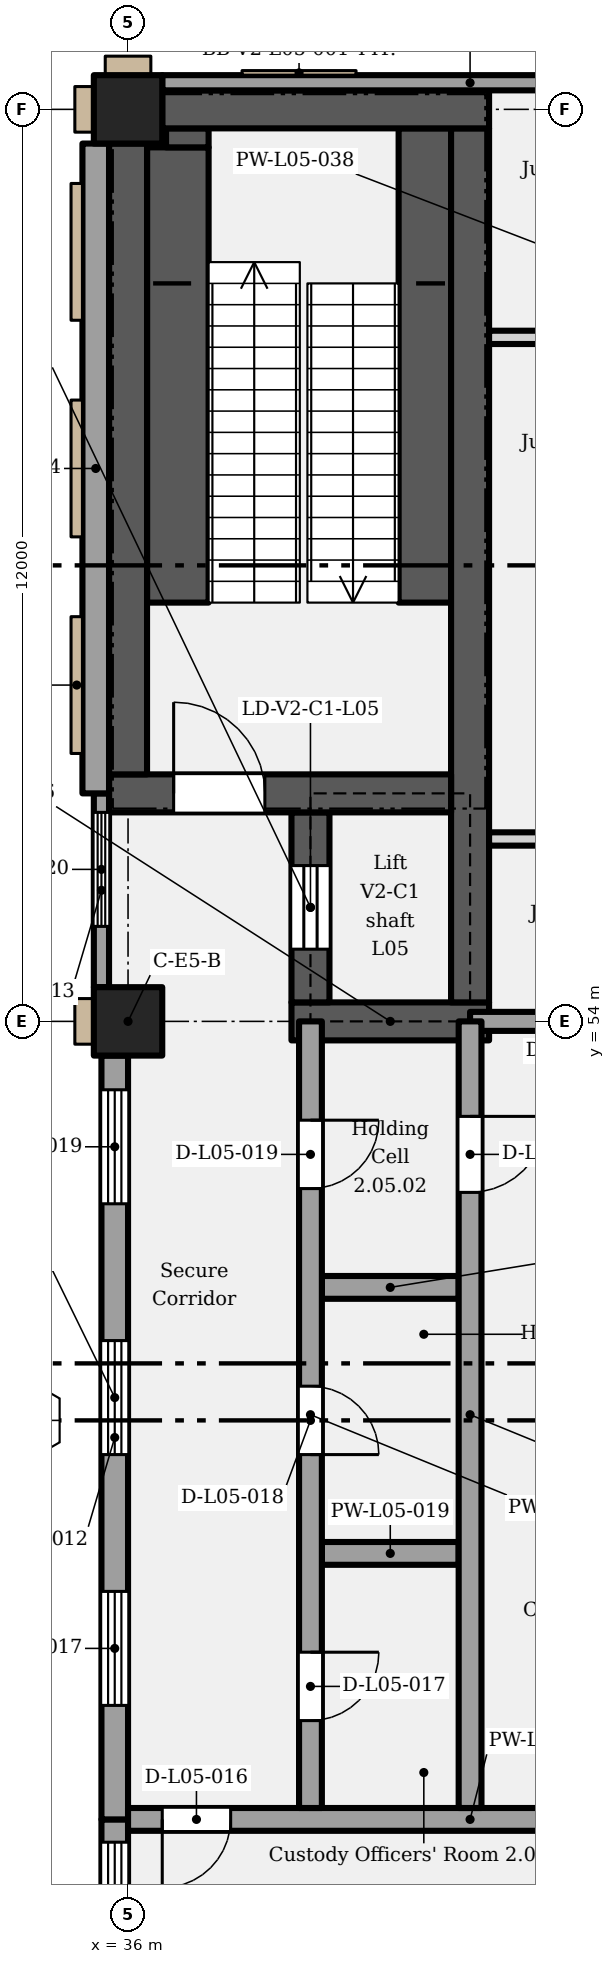
"""IFC4 building model, lengths in metres.
Left out: names, types, materials, properties, quantities, classifications, styles, units other than length and angle.
Written with IfcOpenShell. Run it as: python <this file> out.ifc"""

import sys

from ifc_helpers import new_model, si_unit, direction, frame, frame_2d, origin, origin_2d, place, context, subcontext, project, spatial, rectangle, extrude, element, fill, save


model = new_model("IFC4")
c1 = context("Model", 3, precision=1e-05, world=origin(), true_north=direction((0.0, 1.0)))
c2 = subcontext(c1, "Body", "Model", "MODEL_VIEW")
j1 = project(units=[si_unit("LENGTHUNIT", "METRE"), si_unit("PLANEANGLEUNIT", "RADIAN")], contexts=[c1])
p1 = place(None, origin())
s1 = spatial("IfcSite", under=j1, at=p1, CompositionType="ELEMENT")
p2 = place(p1, origin())
s2 = spatial("IfcBuilding", under=s1, at=p2, CompositionType="ELEMENT")
p3 = place(p2, frame((0.0, 0.0, 28.2)))
s3 = spatial("IfcBuildingStorey", under=s2, at=p3, CompositionType="ELEMENT", Elevation=28.2)
for number, where, z_axis, x_axis in (
    (1, (36.0, 54.0, 0.0), (0.0, 0.0, 1.0), (1.0, 0.0, 0.0)),
    (2, (36.0, 66.0, 0.0), (0.0, 0.0, 1.0), (1.0, 0.0, 0.0)),
):
    element("IfcColumn", number, at=place(p3, frame(where, z_axis=z_axis, x_axis=x_axis)), inside=s3, PredefinedType="COLUMN", context=c2, shape_type="SweptSolid", body=[
        extrude(rectangle(XDim=0.9, YDim=0.9, at=origin_2d()), origin(), (0.0, 0.0, 1.0), 5.4),
    ])
p4 = place(p3, frame((38.15, 54.0, 0.0), z_axis=(0.0, 0.0, 1.0), x_axis=(1.0, 0.0, 0.0)))
e3 = element("IfcWall", 3, at=p4, inside=s3, PredefinedType="SHEAR", context=c2, shape_type="SweptSolid", body=[
    extrude(rectangle(XDim=2.6, YDim=0.5, at=frame_2d((1.3, 0.0))), origin(), (0.0, 0.0, 1.0), 5.15),
])
p5 = place(p3, frame((38.4, 54.25, 0.0), z_axis=(0.0, 0.0, 1.0), x_axis=(0.0, 1.0, 0.0)))
e4 = element("IfcWall", 4, at=p5, inside=s3, PredefinedType="SHEAR", context=c2, shape_type="SweptSolid", body=[
    extrude(rectangle(XDim=2.5, YDim=0.5, at=frame_2d((1.25, 0.0))), origin(), (0.0, 0.0, 1.0), 5.15),
])
p6 = place(p5, frame((0.7, 0.0, 0.0)))
e5 = element("IfcOpeningElement", 5, at=p6, cuts=e4, PredefinedType="OPENING", context=c2, shape_type="SweptSolid", body=[
    extrude(rectangle(XDim=1.1, YDim=2.1, at=frame_2d((0.55, 1.05))), frame((0.0, 0.26, 0.0), z_axis=(0.0, -1.0, 0.0), x_axis=(1.0, 0.0, 0.0)), (0.0, 0.0, 1.0), 0.52),
])
p7 = place(p3, frame((40.5, 54.25, 0.0), z_axis=(0.0, 0.0, 1.0), x_axis=(0.0, 1.0, 0.0)))
e6 = element("IfcWall", 6, at=p7, inside=s3, PredefinedType="SHEAR", context=c2, shape_type="SweptSolid", body=[
    extrude(rectangle(XDim=11.5, YDim=0.5, at=frame_2d((5.75, 0.0))), origin(), (0.0, 0.0, 1.0), 5.15),
])
p8 = place(p3, frame((35.75, 57.0, 0.0), z_axis=(0.0, 0.0, 1.0), x_axis=(1.0, 0.0, 0.0)))
e7 = element("IfcWall", 7, at=p8, inside=s3, PredefinedType="SHEAR", context=c2, shape_type="SweptSolid", body=[
    extrude(rectangle(XDim=4.5, YDim=0.5, at=frame_2d((2.25, 0.0))), origin(), (0.0, 0.0, 1.0), 5.15),
])
p9 = place(p8, frame((0.85, 0.0, 0.0)))
e8 = element("IfcOpeningElement", 8, at=p9, cuts=e7, PredefinedType="OPENING", context=c2, shape_type="SweptSolid", body=[
    extrude(rectangle(XDim=1.2, YDim=2.1, at=frame_2d((0.6, 1.05))), frame((0.0, 0.26, 0.0), z_axis=(0.0, -1.0, 0.0), x_axis=(1.0, 0.0, 0.0)), (0.0, 0.0, 1.0), 0.52),
])
p10 = place(p3, frame((36.0, 57.25, 0.0), z_axis=(0.0, 0.0, 1.0), x_axis=(0.0, 1.0, 0.0)))
e9 = element("IfcWall", 9, at=p10, inside=s3, PredefinedType="SHEAR", context=c2, shape_type="SweptSolid", body=[
    extrude(rectangle(XDim=8.3, YDim=0.5, at=frame_2d((4.15, 0.0))), origin(), (0.0, 0.0, 1.0), 5.15),
])
p11 = place(p3, frame((36.45, 66.0, 0.0), z_axis=(0.0, 0.0, 1.0), x_axis=(1.0, 0.0, 0.0)))
e10 = element("IfcWall", 10, at=p11, inside=s3, PredefinedType="SHEAR", context=c2, shape_type="SweptSolid", body=[
    extrude(rectangle(XDim=4.3, YDim=0.5, at=frame_2d((2.15, 0.0))), origin(), (0.0, 0.0, 1.0), 5.15),
])
p12 = place(p3, frame((36.45, 66.35, 0.0), z_axis=(0.0, 0.0, 1.0), x_axis=(1.0, 0.0, 0.0)))
e11 = element("IfcWall", 11, at=p12, inside=s3, PredefinedType="SOLIDWALL", context=c2, shape_type="SweptSolid", body=[
    extrude(rectangle(XDim=8.1, YDim=0.2, at=frame_2d((4.05, 0.0))), origin(), (0.0, 0.0, 1.0), 5.15),
])
p13 = place(p12, frame((6.525, 0.0, 1.05)))
e12 = element("IfcOpeningElement", 12, at=p13, cuts=e11, PredefinedType="OPENING", context=c2, shape_type="SweptSolid", body=[
    extrude(rectangle(XDim=1.05, YDim=2.4, at=frame_2d((0.525, 1.2))), frame((0.0, 0.11, 0.0), z_axis=(0.0, -1.0, 0.0), x_axis=(1.0, 0.0, 0.0)), (0.0, 0.0, 1.0), 0.22),
])
p14 = place(p3, frame((35.825, 37.95, 0.0), z_axis=(0.0, 0.0, 1.0), x_axis=(0.0, 1.0, 0.0)))
e13 = element("IfcWall", 13, at=p14, inside=s3, PredefinedType="SOLIDWALL", context=c2, shape_type="SweptSolid", body=[
    extrude(rectangle(XDim=5.55, YDim=0.35, at=frame_2d((2.775, 0.0))), origin(), (0.0, 0.0, 1.0), 5.15),
])
p15 = place(p14, frame((0.45, 0.0, 1.05)))
e14 = element("IfcOpeningElement", 14, at=p15, cuts=e13, PredefinedType="OPENING", context=c2, shape_type="SweptSolid", body=[
    extrude(rectangle(XDim=1.5, YDim=3.5, at=frame_2d((0.75, 1.75))), frame((0.0, 0.185, 0.0), z_axis=(0.0, -1.0, 0.0), x_axis=(1.0, 0.0, 0.0)), (0.0, 0.0, 1.0), 0.37),
])
p16 = place(p14, frame((3.75, 0.0, 1.05)))
e15 = element("IfcOpeningElement", 15, at=p16, cuts=e13, PredefinedType="OPENING", context=c2, shape_type="SweptSolid", body=[
    extrude(rectangle(XDim=1.5, YDim=3.5, at=frame_2d((0.75, 1.75))), frame((0.0, 0.185, 0.0), z_axis=(0.0, -1.0, 0.0), x_axis=(1.0, 0.0, 0.0)), (0.0, 0.0, 1.0), 0.37),
])
p17 = place(p3, frame((35.825, 43.5, 0.0), z_axis=(0.0, 0.0, 1.0), x_axis=(0.0, 1.0, 0.0)))
e16 = element("IfcWall", 16, at=p17, inside=s3, PredefinedType="SOLIDWALL", context=c2, shape_type="SweptSolid", body=[
    extrude(rectangle(XDim=10.05, YDim=0.35, at=frame_2d((5.025, 0.0))), origin(), (0.0, 0.0, 1.0), 5.15),
])
p18 = place(p17, frame((1.5, 0.0, 1.05)))
e17 = element("IfcOpeningElement", 17, at=p18, cuts=e16, PredefinedType="OPENING", context=c2, shape_type="SweptSolid", body=[
    extrude(rectangle(XDim=1.5, YDim=3.5, at=frame_2d((0.75, 1.75))), frame((0.0, 0.185, 0.0), z_axis=(0.0, -1.0, 0.0), x_axis=(1.0, 0.0, 0.0)), (0.0, 0.0, 1.0), 0.37),
])
p19 = place(p17, frame((4.8, 0.0, 1.05)))
e18 = element("IfcOpeningElement", 18, at=p19, cuts=e16, PredefinedType="OPENING", context=c2, shape_type="SweptSolid", body=[
    extrude(rectangle(XDim=1.5, YDim=3.5, at=frame_2d((0.75, 1.75))), frame((0.0, 0.185, 0.0), z_axis=(0.0, -1.0, 0.0), x_axis=(1.0, 0.0, 0.0)), (0.0, 0.0, 1.0), 0.37),
])
p20 = place(p17, frame((8.1, 0.0, 1.05)))
e19 = element("IfcOpeningElement", 19, at=p20, cuts=e16, PredefinedType="OPENING", context=c2, shape_type="SweptSolid", body=[
    extrude(rectangle(XDim=1.5, YDim=3.5, at=frame_2d((0.75, 1.75))), frame((0.0, 0.185, 0.0), z_axis=(0.0, -1.0, 0.0), x_axis=(1.0, 0.0, 0.0)), (0.0, 0.0, 1.0), 0.37),
])
p21 = place(p3, frame((35.65, 54.45, 0.0), z_axis=(0.0, 0.0, 1.0), x_axis=(0.0, 1.0, 0.0)))
e20 = element("IfcWall", 20, at=p21, inside=s3, PredefinedType="SOLIDWALL", context=c2, shape_type="SweptSolid", body=[
    extrude(rectangle(XDim=2.55, YDim=0.2, at=frame_2d((1.275, 0.0))), origin(), (0.0, 0.0, 1.0), 5.15),
])
p22 = place(p21, frame((0.8, 0.0, 1.05)))
e21 = element("IfcOpeningElement", 21, at=p22, cuts=e20, PredefinedType="OPENING", context=c2, shape_type="SweptSolid", body=[
    extrude(rectangle(XDim=1.5, YDim=3.5, at=frame_2d((0.75, 1.75))), frame((0.0, 0.11, 0.0), z_axis=(0.0, -1.0, 0.0), x_axis=(1.0, 0.0, 0.0)), (0.0, 0.0, 1.0), 0.22),
])
p23 = place(p3, frame((35.575, 57.0, 0.0), z_axis=(0.0, 0.0, 1.0), x_axis=(0.0, 1.0, 0.0)))
e22 = element("IfcWall", 22, at=p23, inside=s3, PredefinedType="SOLIDWALL", context=c2, shape_type="SweptSolid", body=[
    extrude(rectangle(XDim=8.55, YDim=0.35, at=frame_2d((4.275, 0.0))), origin(), (0.0, 0.0, 1.0), 5.15),
])
p24 = place(p3, frame((36.0, 43.5, 0.0), z_axis=(0.0, 0.0, 1.0), x_axis=(1.0, 0.0, 0.0)))
e23 = element("IfcWall", 23, at=p24, inside=s3, PredefinedType="PARTITIONING", context=c2, shape_type="SweptSolid", body=[
    extrude(rectangle(XDim=9.0, YDim=0.3, at=frame_2d((4.5, 0.0))), origin(), (0.0, 0.0, 1.0), 5.15),
])
p25 = place(p24, frame((1.35, 0.0, 0.0), z_axis=(0.0, 0.0, 1.0), x_axis=(-1.0, 0.0, 0.0)))
e24 = element("IfcOpeningElement", 24, at=p25, cuts=e23, PredefinedType="OPENING", context=c2, shape_type="SweptSolid", body=[
    extrude(rectangle(XDim=0.9, YDim=2.1, at=frame_2d((0.45, 1.05))), frame((0.0, 0.16, 0.0), z_axis=(0.0, -1.0, 0.0), x_axis=(1.0, 0.0, 0.0)), (0.0, 0.0, 1.0), 0.32),
])
for number, where, z_axis, x_axis in (
    (25, (38.55, 47.0, 0.0), (0.0, 0.0, 1.0), (1.0, 0.0, 0.0)),
    (26, (38.55, 50.5, 0.0), (0.0, 0.0, 1.0), (1.0, 0.0, 0.0)),
):
    element("IfcWall", number, at=place(p3, frame(where, z_axis=z_axis, x_axis=x_axis)), inside=s3, PredefinedType="PARTITIONING", context=c2, shape_type="SweptSolid", body=[
        extrude(rectangle(XDim=1.8, YDim=0.3, at=frame_2d((0.9, 0.0))), origin(), (0.0, 0.0, 1.0), 5.15),
    ])
p26 = place(p3, frame((40.5, 54.0, 0.0), z_axis=(0.0, 0.0, 1.0), x_axis=(1.0, 0.0, 0.0)))
e27 = element("IfcWall", 27, at=p26, inside=s3, PredefinedType="PARTITIONING", context=c2, shape_type="SweptSolid", body=[
    extrude(rectangle(XDim=4.05, YDim=0.25, at=frame_2d((2.025, 0.0))), origin(), (0.0, 0.0, 1.0), 4.4),
])
p27 = place(p26, frame((2.3, 0.0, 0.0), z_axis=(0.0, 0.0, 1.0), x_axis=(-1.0, 0.0, 0.0)))
e28 = element("IfcOpeningElement", 28, at=p27, cuts=e27, PredefinedType="OPENING", context=c2, shape_type="SweptSolid", body=[
    extrude(rectangle(XDim=1.0, YDim=2.1, at=frame_2d((0.5, 1.05))), frame((0.0, 0.135, 0.0), z_axis=(0.0, -1.0, 0.0), x_axis=(1.0, 0.0, 0.0)), (0.0, 0.0, 1.0), 0.27),
])
p28 = place(p3, frame((40.75, 56.4, 0.0), z_axis=(0.0, 0.0, 1.0), x_axis=(1.0, 0.0, 0.0)))
e29 = element("IfcWall", 29, at=p28, inside=s3, PredefinedType="PARTITIONING", context=c2, shape_type="SweptSolid", body=[
    extrude(rectangle(XDim=3.275, YDim=0.175, at=frame_2d((1.637, 0.0))), origin(), (0.0, 0.0, 1.0), 5.15),
])
p29 = place(p28, frame((2.0, 0.0, 0.0), z_axis=(0.0, 0.0, 1.0), x_axis=(-1.0, 0.0, 0.0)))
e30 = element("IfcOpeningElement", 30, at=p29, cuts=e29, PredefinedType="OPENING", context=c2, shape_type="SweptSolid", body=[
    extrude(rectangle(XDim=0.9, YDim=2.1, at=frame_2d((0.45, 1.05))), frame((0.0, 0.097, 0.0), z_axis=(0.0, -1.0, 0.0), x_axis=(1.0, 0.0, 0.0)), (0.0, 0.0, 1.0), 0.195),
])
p30 = place(p3, frame((40.75, 63.0, 0.0), z_axis=(0.0, 0.0, 1.0), x_axis=(1.0, 0.0, 0.0)))
e31 = element("IfcWall", 31, at=p30, inside=s3, PredefinedType="PARTITIONING", context=c2, shape_type="SweptSolid", body=[
    extrude(rectangle(XDim=3.35, YDim=0.175, at=frame_2d((1.675, 0.0))), origin(), (0.0, 0.0, 1.0), 5.15),
])
p31 = place(p3, frame((38.4, 43.65, 0.0), z_axis=(0.0, 0.0, 1.0), x_axis=(0.0, 1.0, 0.0)))
e32 = element("IfcWall", 32, at=p31, inside=s3, PredefinedType="PARTITIONING", context=c2, shape_type="SweptSolid", body=[
    extrude(rectangle(XDim=10.35, YDim=0.3, at=frame_2d((5.175, 0.0))), origin(), (0.0, 0.0, 1.0), 5.15),
])
p32 = place(p31, frame((2.05, 0.0, 0.0), z_axis=(0.0, 0.0, 1.0), x_axis=(-1.0, 0.0, 0.0)))
e33 = element("IfcOpeningElement", 33, at=p32, cuts=e32, PredefinedType="OPENING", context=c2, shape_type="SweptSolid", body=[
    extrude(rectangle(XDim=0.9, YDim=2.1, at=frame_2d((0.45, 1.05))), frame((0.0, 0.16, 0.0), z_axis=(0.0, -1.0, 0.0), x_axis=(1.0, 0.0, 0.0)), (0.0, 0.0, 1.0), 0.32),
])
p33 = place(p31, frame((5.55, 0.0, 0.0), z_axis=(0.0, 0.0, 1.0), x_axis=(-1.0, 0.0, 0.0)))
e34 = element("IfcOpeningElement", 34, at=p33, cuts=e32, PredefinedType="OPENING", context=c2, shape_type="SweptSolid", body=[
    extrude(rectangle(XDim=0.9, YDim=2.0, at=frame_2d((0.45, 1.0))), frame((0.0, 0.16, 0.0), z_axis=(0.0, -1.0, 0.0), x_axis=(1.0, 0.0, 0.0)), (0.0, 0.0, 1.0), 0.32),
])
p34 = place(p31, frame((9.05, 0.0, 0.0), z_axis=(0.0, 0.0, 1.0), x_axis=(-1.0, 0.0, 0.0)))
e35 = element("IfcOpeningElement", 35, at=p34, cuts=e32, PredefinedType="OPENING", context=c2, shape_type="SweptSolid", body=[
    extrude(rectangle(XDim=0.9, YDim=2.0, at=frame_2d((0.45, 1.0))), frame((0.0, 0.16, 0.0), z_axis=(0.0, -1.0, 0.0), x_axis=(1.0, 0.0, 0.0)), (0.0, 0.0, 1.0), 0.32),
])
p35 = place(p3, frame((40.5, 43.65, 0.0), z_axis=(0.0, 0.0, 1.0), x_axis=(0.0, 1.0, 0.0)))
e36 = element("IfcWall", 36, at=p35, inside=s3, PredefinedType="PARTITIONING", context=c2, shape_type="SweptSolid", body=[
    extrude(rectangle(XDim=10.35, YDim=0.3, at=frame_2d((5.175, 0.0))), origin(), (0.0, 0.0, 1.0), 5.15),
])
p36 = place(p35, frame((9.1, 0.0, 0.0), z_axis=(0.0, 0.0, 1.0), x_axis=(-1.0, 0.0, 0.0)))
e37 = element("IfcOpeningElement", 37, at=p36, cuts=e36, PredefinedType="OPENING", context=c2, shape_type="SweptSolid", body=[
    extrude(rectangle(XDim=1.0, YDim=2.0, at=frame_2d((0.5, 1.0))), frame((0.0, 0.16, 0.0), z_axis=(0.0, -1.0, 0.0), x_axis=(1.0, 0.0, 0.0)), (0.0, 0.0, 1.0), 0.32),
])
p37 = place(p3, frame((36.655, 59.51, 0.0), z_axis=(0.0, 0.0, 1.0), x_axis=(0.0, 1.0, 0.0)))
e38 = element("IfcWall", 38, at=p37, inside=s3, PredefinedType="SHEAR", context=c2, shape_type="SweptSolid", body=[
    extrude(rectangle(XDim=5.99, YDim=0.81, at=frame_2d((2.995, 0.0))), origin(), (0.0, 0.0, 1.0), 2.587),
])
p38 = place(p3, frame((36.78, 65.5, 0.0), z_axis=(0.0, 0.0, 1.0), x_axis=(0.0, 1.0, 0.0)))
e39 = element("IfcWall", 39, at=p38, inside=s3, PredefinedType="SHEAR", context=c2, shape_type="SweptSolid", body=[
    extrude(rectangle(XDim=0.25, YDim=0.56, at=frame_2d((0.125, 0.0))), origin(), (0.0, 0.0, 1.0), 2.587),
])
p39 = place(p3, frame((39.905, 59.51, 0.0), z_axis=(0.0, 0.0, 1.0), x_axis=(0.0, 1.0, 0.0)))
e40 = element("IfcWall", 40, at=p39, inside=s3, PredefinedType="SHEAR", context=c2, shape_type="SweptSolid", body=[
    extrude(rectangle(XDim=6.24, YDim=0.69, at=frame_2d((3.12, 0.0))), origin(), (0.0, 0.0, 1.0), 2.587),
])
p40 = place(p16, origin())
e41 = element("IfcWindow", 41, at=p40, inside=s3, PartitioningType="SINGLE_PANEL", PredefinedType="WINDOW", context=c2, shape_type="SweptSolid", body=[
    extrude(rectangle(XDim=1.5, YDim=3.5, at=frame_2d((0.75, 1.75))), frame((0.0, 0.03, 0.0), z_axis=(0.0, -1.0, 0.0), x_axis=(1.0, 0.0, 0.0)), (0.0, 0.0, 1.0), 0.06),
])
fill(e15, e41)
p41 = place(p18, origin())
e42 = element("IfcWindow", 42, at=p41, inside=s3, PartitioningType="SINGLE_PANEL", PredefinedType="WINDOW", context=c2, shape_type="SweptSolid", body=[
    extrude(rectangle(XDim=1.5, YDim=3.5, at=frame_2d((0.75, 1.75))), frame((0.0, 0.03, 0.0), z_axis=(0.0, -1.0, 0.0), x_axis=(1.0, 0.0, 0.0)), (0.0, 0.0, 1.0), 0.06),
])
fill(e17, e42)
p42 = place(p19, origin())
e43 = element("IfcWindow", 43, at=p42, inside=s3, PartitioningType="SINGLE_PANEL", PredefinedType="WINDOW", context=c2, shape_type="SweptSolid", body=[
    extrude(rectangle(XDim=1.5, YDim=3.5, at=frame_2d((0.75, 1.75))), frame((0.0, 0.03, 0.0), z_axis=(0.0, -1.0, 0.0), x_axis=(1.0, 0.0, 0.0)), (0.0, 0.0, 1.0), 0.06),
])
fill(e18, e43)
p43 = place(p20, origin())
e44 = element("IfcWindow", 44, at=p43, inside=s3, PartitioningType="SINGLE_PANEL", PredefinedType="WINDOW", context=c2, shape_type="SweptSolid", body=[
    extrude(rectangle(XDim=1.5, YDim=3.5, at=frame_2d((0.75, 1.75))), frame((0.0, 0.03, 0.0), z_axis=(0.0, -1.0, 0.0), x_axis=(1.0, 0.0, 0.0)), (0.0, 0.0, 1.0), 0.06),
])
fill(e19, e44)
p44 = place(p22, origin())
e45 = element("IfcWindow", 45, at=p44, inside=s3, PartitioningType="SINGLE_PANEL", PredefinedType="WINDOW", context=c2, shape_type="SweptSolid", body=[
    extrude(rectangle(XDim=1.5, YDim=3.5, at=frame_2d((0.75, 1.75))), frame((0.0, 0.03, 0.0), z_axis=(0.0, -1.0, 0.0), x_axis=(1.0, 0.0, 0.0)), (0.0, 0.0, 1.0), 0.06),
])
fill(e21, e45)
p45 = place(p6, origin())
e46 = element("IfcDoor", 46, at=p45, inside=s3, OperationType="SLIDING_TO_LEFT", PredefinedType="DOOR", context=c2, shape_type="SweptSolid", body=[
    extrude(rectangle(XDim=1.1, YDim=2.1, at=frame_2d((0.55, 1.05))), frame((0.0, 0.025, 0.0), z_axis=(0.0, -1.0, 0.0), x_axis=(1.0, 0.0, 0.0)), (0.0, 0.0, 1.0), 0.05),
])
fill(e5, e46)
p46 = place(p9, origin())
e47 = element("IfcDoor", 47, at=p46, inside=s3, OperationType="SINGLE_SWING_LEFT", PredefinedType="DOOR", context=c2, shape_type="SweptSolid", body=[
    extrude(rectangle(XDim=1.2, YDim=2.1, at=frame_2d((0.6, 1.05))), frame((0.0, 0.025, 0.0), z_axis=(0.0, -1.0, 0.0), x_axis=(1.0, 0.0, 0.0)), (0.0, 0.0, 1.0), 0.05),
])
fill(e8, e47)
p47 = place(p25, origin())
e48 = element("IfcDoor", 48, at=p47, inside=s3, OperationType="SINGLE_SWING_RIGHT", PredefinedType="DOOR", context=c2, shape_type="SweptSolid", body=[
    extrude(rectangle(XDim=0.9, YDim=2.1, at=frame_2d((0.45, 1.05))), frame((0.0, 0.025, 0.0), z_axis=(0.0, -1.0, 0.0), x_axis=(1.0, 0.0, 0.0)), (0.0, 0.0, 1.0), 0.05),
])
fill(e24, e48)
p48 = place(p32, origin())
e49 = element("IfcDoor", 49, at=p48, inside=s3, OperationType="SINGLE_SWING_LEFT", PredefinedType="DOOR", context=c2, shape_type="SweptSolid", body=[
    extrude(rectangle(XDim=0.9, YDim=2.1, at=frame_2d((0.45, 1.05))), frame((0.0, 0.025, 0.0), z_axis=(0.0, -1.0, 0.0), x_axis=(1.0, 0.0, 0.0)), (0.0, 0.0, 1.0), 0.05),
])
fill(e33, e49)
p49 = place(p33, origin())
e50 = element("IfcDoor", 50, at=p49, inside=s3, OperationType="SINGLE_SWING_RIGHT", PredefinedType="DOOR", context=c2, shape_type="SweptSolid", body=[
    extrude(rectangle(XDim=0.9, YDim=2.0, at=frame_2d((0.45, 1.0))), frame((0.0, 0.025, 0.0), z_axis=(0.0, -1.0, 0.0), x_axis=(1.0, 0.0, 0.0)), (0.0, 0.0, 1.0), 0.05),
])
fill(e34, e50)
p50 = place(p34, origin())
e51 = element("IfcDoor", 51, at=p50, inside=s3, OperationType="SINGLE_SWING_LEFT", PredefinedType="DOOR", context=c2, shape_type="SweptSolid", body=[
    extrude(rectangle(XDim=0.9, YDim=2.0, at=frame_2d((0.45, 1.0))), frame((0.0, 0.025, 0.0), z_axis=(0.0, -1.0, 0.0), x_axis=(1.0, 0.0, 0.0)), (0.0, 0.0, 1.0), 0.05),
])
fill(e35, e51)
p51 = place(p36, origin())
e52 = element("IfcDoor", 52, at=p51, inside=s3, OperationType="SINGLE_SWING_LEFT", PredefinedType="DOOR", context=c2, shape_type="SweptSolid", body=[
    extrude(rectangle(XDim=1.0, YDim=2.0, at=frame_2d((0.5, 1.0))), frame((0.0, 0.025, 0.0), z_axis=(0.0, -1.0, 0.0), x_axis=(1.0, 0.0, 0.0)), (0.0, 0.0, 1.0), 0.05),
])
fill(e37, e52)
save(model, sys.argv[1])
